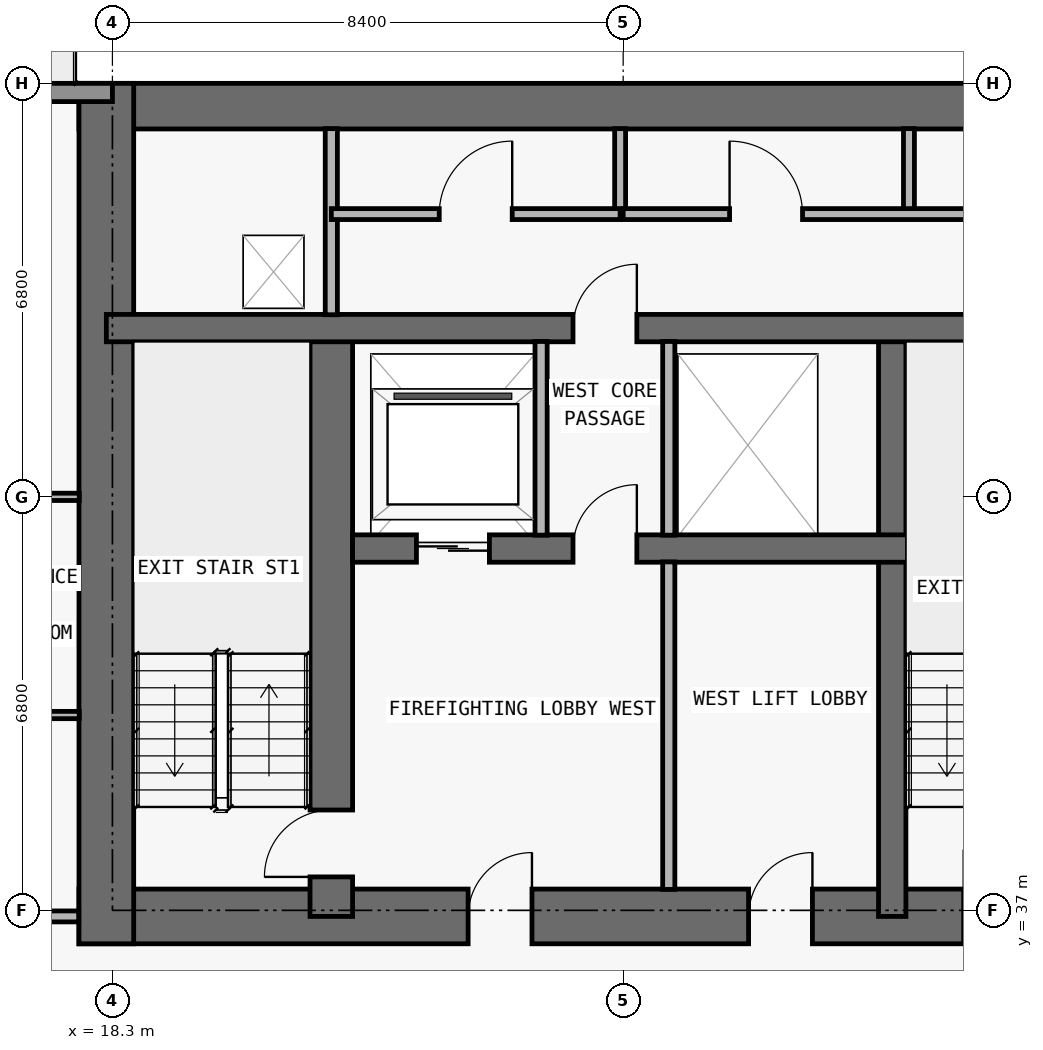
"""IFC4 building model, lengths in metres.
Left out: names, types, materials, properties, quantities, classifications, styles, units other than length and angle.
Written with IfcOpenShell. Run it as: python <this file> out.ifc"""

import sys

from ifc_helpers import new_model, si_unit, direction, frame, frame_2d, origin, place, context, subcontext, project, spatial, rectangle, extrude, element, fill, save


model = new_model("IFC4")
c1 = context("Model", 3, precision=1e-05, world=origin(), true_north=direction((0.0, 1.0)))
c2 = subcontext(c1, "Body", "Model", "MODEL_VIEW")
j1 = project(units=[si_unit("LENGTHUNIT", "METRE"), si_unit("PLANEANGLEUNIT", "RADIAN")], contexts=[c1])
p1 = place(None, origin())
s1 = spatial("IfcSite", under=j1, at=p1, CompositionType="ELEMENT")
p2 = place(p1, origin())
s2 = spatial("IfcBuilding", under=s1, at=p2, CompositionType="ELEMENT")
p3 = place(p2, frame((0.0, 0.0, 66.3)))
s3 = spatial("IfcBuildingStorey", under=s2, at=p3, CompositionType="ELEMENT", Elevation=66.3)
p4 = place(p3, frame((17.75, 36.9, 0.0), z_axis=(0.0, 0.0, 1.0), x_axis=(1.0, 0.0, 0.0)))
e1 = element("IfcWall", 1, at=p4, inside=s3, PredefinedType="SHEAR", context=c2, shape_type="SweptSolid", body=[
    extrude(rectangle(XDim=42.3, YDim=0.9, at=frame_2d((21.15, 0.0))), origin(), (0.0, 0.0, 1.0), 3.05),
])
p5 = place(p4, frame((14.55, 0.0, 0.0)))
e2 = element("IfcOpeningElement", 2, at=p5, cuts=e1, PredefinedType="OPENING", context=c2, shape_type="SweptSolid", body=[
    extrude(rectangle(XDim=1.1, YDim=2.15, at=frame_2d((0.55, 1.075))), frame((0.0, 0.46, 0.0), z_axis=(0.0, -1.0, 0.0), x_axis=(1.0, 0.0, 0.0)), (0.0, 0.0, 1.0), 0.92),
])
p6 = place(p4, frame((6.4, 0.0, 0.0)))
e3 = element("IfcOpeningElement", 3, at=p6, cuts=e1, PredefinedType="OPENING", context=c2, shape_type="SweptSolid", body=[
    extrude(rectangle(XDim=1.05, YDim=2.15, at=frame_2d((0.525, 1.075))), frame((0.0, 0.46, 0.0), z_axis=(0.0, -1.0, 0.0), x_axis=(1.0, 0.0, 0.0)), (0.0, 0.0, 1.0), 0.92),
])
p7 = place(p4, frame((34.9, 0.0, 0.0)))
e4 = element("IfcOpeningElement", 4, at=p7, cuts=e1, PredefinedType="OPENING", context=c2, shape_type="SweptSolid", body=[
    extrude(rectangle(XDim=1.05, YDim=2.15, at=frame_2d((0.525, 1.075))), frame((0.0, 0.46, 0.0), z_axis=(0.0, -1.0, 0.0), x_axis=(1.0, 0.0, 0.0)), (0.0, 0.0, 1.0), 0.92),
])
p8 = place(p4, frame((11.012, 0.0, 0.0)))
e5 = element("IfcOpeningElement", 5, at=p8, cuts=e1, PredefinedType="OPENING", context=c2, shape_type="SweptSolid", body=[
    extrude(rectangle(XDim=1.05, YDim=2.15, at=frame_2d((0.525, 1.075))), frame((0.0, 0.46, 0.0), z_axis=(0.0, -1.0, 0.0), x_axis=(1.0, 0.0, 0.0)), (0.0, 0.0, 1.0), 0.92),
])
p9 = place(p4, frame((24.25, 0.0, 0.0)))
e6 = element("IfcOpeningElement", 6, at=p9, cuts=e1, PredefinedType="OPENING", context=c2, shape_type="SweptSolid", body=[
    extrude(rectangle(XDim=1.05, YDim=2.15, at=frame_2d((0.525, 1.075))), frame((0.0, 0.46, 0.0), z_axis=(0.0, -1.0, 0.0), x_axis=(1.0, 0.0, 0.0)), (0.0, 0.0, 1.0), 0.92),
])
p10 = place(p3, frame((17.75, 50.225, 0.0), z_axis=(0.0, 0.0, 1.0), x_axis=(1.0, 0.0, 0.0)))
e7 = element("IfcWall", 7, at=p10, inside=s3, PredefinedType="SHEAR", context=c2, shape_type="SweptSolid", body=[
    extrude(rectangle(XDim=42.3, YDim=0.75, at=frame_2d((21.15, 0.0))), origin(), (0.0, 0.0, 1.0), 3.05),
])
p11 = place(p3, frame((18.2, 36.45, 0.0), z_axis=(0.0, 0.0, 1.0), x_axis=(0.0, 1.0, 0.0)))
e8 = element("IfcWall", 8, at=p11, inside=s3, PredefinedType="SHEAR", context=c2, shape_type="SweptSolid", body=[
    extrude(rectangle(XDim=14.15, YDim=0.9, at=frame_2d((7.075, 0.0))), origin(), (0.0, 0.0, 1.0), 3.05),
])
p12 = place(p3, frame((21.9, 36.9, 0.0), z_axis=(0.0, 0.0, 1.0), x_axis=(0.0, 1.0, 0.0)))
e9 = element("IfcWall", 9, at=p12, inside=s3, PredefinedType="SHEAR", context=c2, shape_type="SweptSolid", body=[
    extrude(rectangle(XDim=9.675, YDim=0.7, at=frame_2d((4.837, 0.0))), origin(), (0.0, 0.0, 1.0), 3.05),
])
p13 = place(p12, frame((0.65, 0.0, 0.0)))
e10 = element("IfcOpeningElement", 10, at=p13, cuts=e9, PredefinedType="OPENING", context=c2, shape_type="SweptSolid", body=[
    extrude(rectangle(XDim=1.1, YDim=2.15, at=frame_2d((0.55, 1.075))), frame((0.0, 0.36, 0.0), z_axis=(0.0, -1.0, 0.0), x_axis=(1.0, 0.0, 0.0)), (0.0, 0.0, 1.0), 0.72),
])
p14 = place(p3, frame((31.125, 36.9, 0.0), z_axis=(0.0, 0.0, 1.0), x_axis=(0.0, 1.0, 0.0)))
e11 = element("IfcWall", 11, at=p14, inside=s3, PredefinedType="SHEAR", context=c2, shape_type="SweptSolid", body=[
    extrude(rectangle(XDim=9.675, YDim=0.45, at=frame_2d((4.837, 0.0))), origin(), (0.0, 0.0, 1.0), 3.05),
])
p15 = place(p3, frame((22.25, 42.95, 0.0), z_axis=(0.0, 0.0, 1.0), x_axis=(1.0, 0.0, 0.0)))
e12 = element("IfcWall", 12, at=p15, inside=s3, PredefinedType="SHEAR", context=c2, shape_type="SweptSolid", body=[
    extrude(rectangle(XDim=33.3, YDim=0.45, at=frame_2d((16.65, 0.0))), origin(), (0.0, 0.0, 1.0), 3.05),
])
p16 = place(p15, frame((1.05, 0.0, 0.0)))
e13 = element("IfcOpeningElement", 13, at=p16, cuts=e12, PredefinedType="OPENING", context=c2, shape_type="SweptSolid", body=[
    extrude(rectangle(XDim=1.2, YDim=2.2, at=frame_2d((0.6, 1.1))), frame((0.0, 0.235, 0.0), z_axis=(0.0, -1.0, 0.0), x_axis=(1.0, 0.0, 0.0)), (0.0, 0.0, 1.0), 0.47),
])
p17 = place(p15, frame((31.05, 0.0, 0.0)))
e14 = element("IfcOpeningElement", 14, at=p17, cuts=e12, PredefinedType="OPENING", context=c2, shape_type="SweptSolid", body=[
    extrude(rectangle(XDim=1.2, YDim=2.2, at=frame_2d((0.6, 1.1))), frame((0.0, 0.235, 0.0), z_axis=(0.0, -1.0, 0.0), x_axis=(1.0, 0.0, 0.0)), (0.0, 0.0, 1.0), 0.47),
])
p18 = place(p15, frame((13.5, 0.0, 0.0)))
e15 = element("IfcOpeningElement", 15, at=p18, cuts=e12, PredefinedType="OPENING", context=c2, shape_type="SweptSolid", body=[
    extrude(rectangle(XDim=1.1, YDim=2.2, at=frame_2d((0.55, 1.1))), frame((0.0, 0.235, 0.0), z_axis=(0.0, -1.0, 0.0), x_axis=(1.0, 0.0, 0.0)), (0.0, 0.0, 1.0), 0.47),
])
p19 = place(p15, frame((16.1, 0.0, 0.0)))
e16 = element("IfcOpeningElement", 16, at=p19, cuts=e12, PredefinedType="OPENING", context=c2, shape_type="SweptSolid", body=[
    extrude(rectangle(XDim=1.1, YDim=2.2, at=frame_2d((0.55, 1.1))), frame((0.0, 0.235, 0.0), z_axis=(0.0, -1.0, 0.0), x_axis=(1.0, 0.0, 0.0)), (0.0, 0.0, 1.0), 0.47),
])
p20 = place(p15, frame((18.7, 0.0, 0.0)))
e17 = element("IfcOpeningElement", 17, at=p20, cuts=e12, PredefinedType="OPENING", context=c2, shape_type="SweptSolid", body=[
    extrude(rectangle(XDim=1.1, YDim=2.2, at=frame_2d((0.55, 1.1))), frame((0.0, 0.235, 0.0), z_axis=(0.0, -1.0, 0.0), x_axis=(1.0, 0.0, 0.0)), (0.0, 0.0, 1.0), 0.47),
])
p21 = place(p15, frame((3.625, 0.0, 0.0)))
e18 = element("IfcOpeningElement", 18, at=p21, cuts=e12, PredefinedType="OPENING", context=c2, shape_type="SweptSolid", body=[
    extrude(rectangle(XDim=1.05, YDim=2.15, at=frame_2d((0.525, 1.075))), frame((0.0, 0.235, 0.0), z_axis=(0.0, -1.0, 0.0), x_axis=(1.0, 0.0, 0.0)), (0.0, 0.0, 1.0), 0.47),
])
p22 = place(p15, frame((28.675, 0.0, 0.0)))
e19 = element("IfcOpeningElement", 19, at=p22, cuts=e12, PredefinedType="OPENING", context=c2, shape_type="SweptSolid", body=[
    extrude(rectangle(XDim=1.05, YDim=2.15, at=frame_2d((0.525, 1.075))), frame((0.0, 0.235, 0.0), z_axis=(0.0, -1.0, 0.0), x_axis=(1.0, 0.0, 0.0)), (0.0, 0.0, 1.0), 0.47),
])
p23 = place(p3, frame((18.2, 46.575, 0.0), z_axis=(0.0, 0.0, 1.0), x_axis=(1.0, 0.0, 0.0)))
e20 = element("IfcWall", 20, at=p23, inside=s3, PredefinedType="SHEAR", context=c2, shape_type="SweptSolid", body=[
    extrude(rectangle(XDim=41.4, YDim=0.45, at=frame_2d((20.7, 0.0))), origin(), (0.0, 0.0, 1.0), 3.05),
])
p24 = place(p23, frame((7.675, 0.0, 0.0)))
e21 = element("IfcOpeningElement", 21, at=p24, cuts=e20, PredefinedType="OPENING", context=c2, shape_type="SweptSolid", body=[
    extrude(rectangle(XDim=1.05, YDim=2.15, at=frame_2d((0.525, 1.075))), frame((0.0, 0.235, 0.0), z_axis=(0.0, -1.0, 0.0), x_axis=(1.0, 0.0, 0.0)), (0.0, 0.0, 1.0), 0.47),
])
p25 = place(p23, frame((32.725, 0.0, 0.0)))
e22 = element("IfcOpeningElement", 22, at=p25, cuts=e20, PredefinedType="OPENING", context=c2, shape_type="SweptSolid", body=[
    extrude(rectangle(XDim=1.05, YDim=2.15, at=frame_2d((0.525, 1.075))), frame((0.0, 0.235, 0.0), z_axis=(0.0, -1.0, 0.0), x_axis=(1.0, 0.0, 0.0)), (0.0, 0.0, 1.0), 0.47),
])
p26 = place(p3, frame((5.1, 50.45, 0.0), z_axis=(0.0, 0.0, 1.0), x_axis=(1.0, 0.0, 0.0)))
e23 = element("IfcWall", 23, at=p26, inside=s3, PredefinedType="STANDARD", context=c2, shape_type="SweptSolid", body=[
    extrude(rectangle(XDim=13.2, YDim=0.3, at=frame_2d((6.6, 0.0))), origin(), (0.0, 0.0, 1.0), 3.05),
])
p27 = place(p26, frame((5.6, 0.0, 0.0)))
e24 = element("IfcOpeningElement", 24, at=p27, cuts=e23, PredefinedType="OPENING", context=c2, shape_type="SweptSolid", body=[
    extrude(rectangle(XDim=2.0, YDim=2.3, at=frame_2d((1.0, 1.15))), frame((0.0, 0.16, 0.0), z_axis=(0.0, -1.0, 0.0), x_axis=(1.0, 0.0, 0.0)), (0.0, 0.0, 1.0), 0.32),
])
p28 = place(p3, frame((21.9, 46.795, 0.0), z_axis=(0.0, 0.0, 1.0), x_axis=(0.0, 1.0, 0.0)))
e25 = element("IfcWall", 25, at=p28, inside=s3, PredefinedType="PARTITIONING", context=c2, shape_type="SweptSolid", body=[
    extrude(rectangle(XDim=3.06, YDim=0.2, at=frame_2d((1.53, 0.0))), origin(), (0.0, 0.0, 1.0), 3.05),
])
p29 = place(p3, frame((25.35, 43.17, 0.0), z_axis=(0.0, 0.0, 1.0), x_axis=(0.0, 1.0, 0.0)))
e26 = element("IfcWall", 26, at=p29, inside=s3, PredefinedType="PARTITIONING", context=c2, shape_type="SweptSolid", body=[
    extrude(rectangle(XDim=3.185, YDim=0.2, at=frame_2d((1.593, 0.0))), origin(), (0.0, 0.0, 1.0), 3.05),
])
p30 = place(p3, frame((26.65, 48.45, 0.0), z_axis=(0.0, 0.0, 1.0), x_axis=(0.0, 1.0, 0.0)))
e27 = element("IfcWall", 27, at=p30, inside=s3, PredefinedType="PARTITIONING", context=c2, shape_type="SweptSolid", body=[
    extrude(rectangle(XDim=1.405, YDim=0.18, at=frame_2d((0.703, 0.0))), origin(), (0.0, 0.0, 1.0), 3.05),
])
p31 = place(p3, frame((27.45, 37.345, 0.0), z_axis=(0.0, 0.0, 1.0), x_axis=(0.0, 1.0, 0.0)))
e28 = element("IfcWall", 28, at=p31, inside=s3, PredefinedType="PARTITIONING", context=c2, shape_type="SweptSolid", body=[
    extrude(rectangle(XDim=5.385, YDim=0.2, at=frame_2d((2.692, 0.0))), origin(), (0.0, 0.0, 1.0), 3.05),
])
p32 = place(p3, frame((27.45, 43.17, 0.0), z_axis=(0.0, 0.0, 1.0), x_axis=(0.0, 1.0, 0.0)))
e29 = element("IfcWall", 29, at=p32, inside=s3, PredefinedType="PARTITIONING", context=c2, shape_type="SweptSolid", body=[
    extrude(rectangle(XDim=3.185, YDim=0.2, at=frame_2d((1.593, 0.0))), origin(), (0.0, 0.0, 1.0), 3.05),
])
p33 = place(p3, frame((31.4, 48.45, 0.0), z_axis=(0.0, 0.0, 1.0), x_axis=(0.0, 1.0, 0.0)))
e30 = element("IfcWall", 30, at=p33, inside=s3, PredefinedType="PARTITIONING", context=c2, shape_type="SweptSolid", body=[
    extrude(rectangle(XDim=1.405, YDim=0.18, at=frame_2d((0.703, 0.0))), origin(), (0.0, 0.0, 1.0), 3.05),
])
p34 = place(p3, frame((5.1, 36.9, 0.0), z_axis=(0.0, 0.0, 1.0), x_axis=(1.0, 0.0, 0.0)))
e31 = element("IfcWall", 31, at=p34, inside=s3, PredefinedType="PARTITIONING", context=c2, shape_type="SweptSolid", body=[
    extrude(rectangle(XDim=12.645, YDim=0.18, at=frame_2d((6.323, 0.0))), origin(), (0.0, 0.0, 1.0), 3.05),
])
p35 = place(p34, frame((7.125, 0.0, 0.0)))
e32 = element("IfcOpeningElement", 32, at=p35, cuts=e31, PredefinedType="OPENING", context=c2, shape_type="SweptSolid", body=[
    extrude(rectangle(XDim=1.0, YDim=2.2, at=frame_2d((0.5, 1.1))), frame((0.0, 0.1, 0.0), z_axis=(0.0, -1.0, 0.0), x_axis=(1.0, 0.0, 0.0)), (0.0, 0.0, 1.0), 0.2),
])
p36 = place(p3, frame((15.55, 40.212, 0.0), z_axis=(0.0, 0.0, 1.0), x_axis=(1.0, 0.0, 0.0)))
e33 = element("IfcWall", 33, at=p36, inside=s3, PredefinedType="PARTITIONING", context=c2, shape_type="SweptSolid", body=[
    extrude(rectangle(XDim=2.205, YDim=0.12, at=frame_2d((1.103, 0.0))), origin(), (0.0, 0.0, 1.0), 3.05),
])
p37 = place(p3, frame((1.795, 43.8, 0.0), z_axis=(0.0, 0.0, 1.0), x_axis=(1.0, 0.0, 0.0)))
e34 = element("IfcWall", 34, at=p37, inside=s3, PredefinedType="PARTITIONING", context=c2, shape_type="SweptSolid", body=[
    extrude(rectangle(XDim=15.96, YDim=0.12, at=frame_2d((7.98, 0.0))), origin(), (0.0, 0.0, 1.0), 2.339),
])
p38 = place(p37, frame((5.255, 0.0, 0.0)))
e35 = element("IfcOpeningElement", 35, at=p38, cuts=e34, PredefinedType="OPENING", context=c2, shape_type="SweptSolid", body=[
    extrude(rectangle(XDim=0.9, YDim=2.15, at=frame_2d((0.45, 1.075))), frame((0.0, 0.07, 0.0), z_axis=(0.0, -1.0, 0.0), x_axis=(1.0, 0.0, 0.0)), (0.0, 0.0, 1.0), 0.14),
])
p39 = place(p37, frame((10.48, 0.0, 0.0)))
e36 = element("IfcOpeningElement", 36, at=p39, cuts=e34, PredefinedType="OPENING", context=c2, shape_type="SweptSolid", body=[
    extrude(rectangle(XDim=0.9, YDim=2.15, at=frame_2d((0.45, 1.075))), frame((0.0, 0.07, 0.0), z_axis=(0.0, -1.0, 0.0), x_axis=(1.0, 0.0, 0.0)), (0.0, 0.0, 1.0), 0.14),
])
p40 = place(p37, frame((14.433, 0.0, 0.0)))
e37 = element("IfcOpeningElement", 37, at=p40, cuts=e34, PredefinedType="OPENING", context=c2, shape_type="SweptSolid", body=[
    extrude(rectangle(XDim=0.85, YDim=2.1, at=frame_2d((0.425, 1.05))), frame((0.0, 0.07, 0.0), z_axis=(0.0, -1.0, 0.0), x_axis=(1.0, 0.0, 0.0)), (0.0, 0.0, 1.0), 0.14),
])
p41 = place(p3, frame((21.9, 48.45, 0.0), z_axis=(0.0, 0.0, 1.0), x_axis=(1.0, 0.0, 0.0)))
e38 = element("IfcWall", 38, at=p41, inside=s3, PredefinedType="PARTITIONING", context=c2, shape_type="SweptSolid", body=[
    extrude(rectangle(XDim=4.75, YDim=0.18, at=frame_2d((2.375, 0.0))), origin(), (0.0, 0.0, 1.0), 3.05),
])
p42 = place(p41, frame((1.775, 0.0, 0.0)))
e39 = element("IfcOpeningElement", 39, at=p42, cuts=e38, PredefinedType="OPENING", context=c2, shape_type="SweptSolid", body=[
    extrude(rectangle(XDim=1.2, YDim=2.2, at=frame_2d((0.6, 1.1))), frame((0.0, 0.1, 0.0), z_axis=(0.0, -1.0, 0.0), x_axis=(1.0, 0.0, 0.0)), (0.0, 0.0, 1.0), 0.2),
])
p43 = place(p3, frame((26.7, 48.45, 0.0), z_axis=(0.0, 0.0, 1.0), x_axis=(1.0, 0.0, 0.0)))
e40 = element("IfcWall", 40, at=p43, inside=s3, PredefinedType="PARTITIONING", context=c2, shape_type="SweptSolid", body=[
    extrude(rectangle(XDim=29.2, YDim=0.18, at=frame_2d((14.6, 0.0))), origin(), (0.0, 0.0, 1.0), 3.05),
])
p44 = place(p43, frame((1.75, 0.0, 0.0)))
e41 = element("IfcOpeningElement", 41, at=p44, cuts=e40, PredefinedType="OPENING", context=c2, shape_type="SweptSolid", body=[
    extrude(rectangle(XDim=1.2, YDim=2.2, at=frame_2d((0.6, 1.1))), frame((0.0, 0.1, 0.0), z_axis=(0.0, -1.0, 0.0), x_axis=(1.0, 0.0, 0.0)), (0.0, 0.0, 1.0), 0.2),
])
p45 = place(p43, frame((6.475, 0.0, 0.0)))
e42 = element("IfcOpeningElement", 42, at=p45, cuts=e40, PredefinedType="OPENING", context=c2, shape_type="SweptSolid", body=[
    extrude(rectangle(XDim=1.2, YDim=2.2, at=frame_2d((0.6, 1.1))), frame((0.0, 0.1, 0.0), z_axis=(0.0, -1.0, 0.0), x_axis=(1.0, 0.0, 0.0)), (0.0, 0.0, 1.0), 0.2),
])
p46 = place(p43, frame((14.05, 0.0, 0.0)))
e43 = element("IfcOpeningElement", 43, at=p46, cuts=e40, PredefinedType="OPENING", context=c2, shape_type="SweptSolid", body=[
    extrude(rectangle(XDim=1.0, YDim=2.2, at=frame_2d((0.5, 1.1))), frame((0.0, 0.1, 0.0), z_axis=(0.0, -1.0, 0.0), x_axis=(1.0, 0.0, 0.0)), (0.0, 0.0, 1.0), 0.2),
])
p47 = place(p43, frame((21.425, 0.0, 0.0)))
e44 = element("IfcOpeningElement", 44, at=p47, cuts=e40, PredefinedType="OPENING", context=c2, shape_type="SweptSolid", body=[
    extrude(rectangle(XDim=1.2, YDim=2.2, at=frame_2d((0.6, 1.1))), frame((0.0, 0.1, 0.0), z_axis=(0.0, -1.0, 0.0), x_axis=(1.0, 0.0, 0.0)), (0.0, 0.0, 1.0), 0.2),
])
p48 = place(p43, frame((26.375, 0.0, 0.0)))
e45 = element("IfcOpeningElement", 45, at=p48, cuts=e40, PredefinedType="OPENING", context=c2, shape_type="SweptSolid", body=[
    extrude(rectangle(XDim=0.85, YDim=2.1, at=frame_2d((0.425, 1.05))), frame((0.0, 0.1, 0.0), z_axis=(0.0, -1.0, 0.0), x_axis=(1.0, 0.0, 0.0)), (0.0, 0.0, 1.0), 0.2),
])
p49 = place(p16, origin())
e46 = element("IfcDoor", 46, at=p49, inside=s3, OperationType="DOUBLE_DOOR_SLIDING", PredefinedType="DOOR", context=c2, shape_type="SweptSolid", body=[
    extrude(rectangle(XDim=1.2, YDim=2.2, at=frame_2d((0.6, 1.1))), frame((0.0, 0.025, 0.0), z_axis=(0.0, -1.0, 0.0), x_axis=(1.0, 0.0, 0.0)), (0.0, 0.0, 1.0), 0.05),
])
fill(e13, e46)
p50 = place(p6, origin())
e47 = element("IfcDoor", 47, at=p50, inside=s3, OperationType="SINGLE_SWING_RIGHT", PredefinedType="DOOR", context=c2, shape_type="SweptSolid", body=[
    extrude(rectangle(XDim=1.05, YDim=2.15, at=frame_2d((0.525, 1.075))), frame((0.0, 0.025, 0.0), z_axis=(0.0, -1.0, 0.0), x_axis=(1.0, 0.0, 0.0)), (0.0, 0.0, 1.0), 0.05),
])
fill(e3, e47)
p51 = place(p13, origin())
e48 = element("IfcDoor", 48, at=p51, inside=s3, OperationType="SINGLE_SWING_LEFT", PredefinedType="DOOR", context=c2, shape_type="SweptSolid", body=[
    extrude(rectangle(XDim=1.1, YDim=2.15, at=frame_2d((0.55, 1.075))), frame((0.0, 0.025, 0.0), z_axis=(0.0, -1.0, 0.0), x_axis=(1.0, 0.0, 0.0)), (0.0, 0.0, 1.0), 0.05),
])
fill(e10, e48)
p52 = place(p21, origin())
e49 = element("IfcDoor", 49, at=p52, inside=s3, OperationType="SINGLE_SWING_RIGHT", PredefinedType="DOOR", context=c2, shape_type="SweptSolid", body=[
    extrude(rectangle(XDim=1.05, YDim=2.15, at=frame_2d((0.525, 1.075))), frame((0.0, 0.025, 0.0), z_axis=(0.0, -1.0, 0.0), x_axis=(1.0, 0.0, 0.0)), (0.0, 0.0, 1.0), 0.05),
])
fill(e18, e49)
p53 = place(p8, origin())
e50 = element("IfcDoor", 50, at=p53, inside=s3, OperationType="SINGLE_SWING_RIGHT", PredefinedType="DOOR", context=c2, shape_type="SweptSolid", body=[
    extrude(rectangle(XDim=1.05, YDim=2.15, at=frame_2d((0.525, 1.075))), frame((0.0, 0.025, 0.0), z_axis=(0.0, -1.0, 0.0), x_axis=(1.0, 0.0, 0.0)), (0.0, 0.0, 1.0), 0.05),
])
fill(e5, e50)
p54 = place(p24, origin())
e51 = element("IfcDoor", 51, at=p54, inside=s3, OperationType="SINGLE_SWING_RIGHT", PredefinedType="DOOR", context=c2, shape_type="SweptSolid", body=[
    extrude(rectangle(XDim=1.05, YDim=2.15, at=frame_2d((0.525, 1.075))), frame((0.0, 0.025, 0.0), z_axis=(0.0, -1.0, 0.0), x_axis=(1.0, 0.0, 0.0)), (0.0, 0.0, 1.0), 0.05),
])
fill(e21, e51)
p55 = place(p42, origin())
e52 = element("IfcDoor", 52, at=p55, inside=s3, OperationType="SINGLE_SWING_RIGHT", PredefinedType="DOOR", context=c2, shape_type="SweptSolid", body=[
    extrude(rectangle(XDim=1.2, YDim=2.2, at=frame_2d((0.6, 1.1))), frame((0.0, 0.025, 0.0), z_axis=(0.0, -1.0, 0.0), x_axis=(1.0, 0.0, 0.0)), (0.0, 0.0, 1.0), 0.05),
])
fill(e39, e52)
p56 = place(p44, origin())
e53 = element("IfcDoor", 53, at=p56, inside=s3, OperationType="SINGLE_SWING_LEFT", PredefinedType="DOOR", context=c2, shape_type="SweptSolid", body=[
    extrude(rectangle(XDim=1.2, YDim=2.2, at=frame_2d((0.6, 1.1))), frame((0.0, 0.025, 0.0), z_axis=(0.0, -1.0, 0.0), x_axis=(1.0, 0.0, 0.0)), (0.0, 0.0, 1.0), 0.05),
])
fill(e41, e53)
save(model, sys.argv[1])
